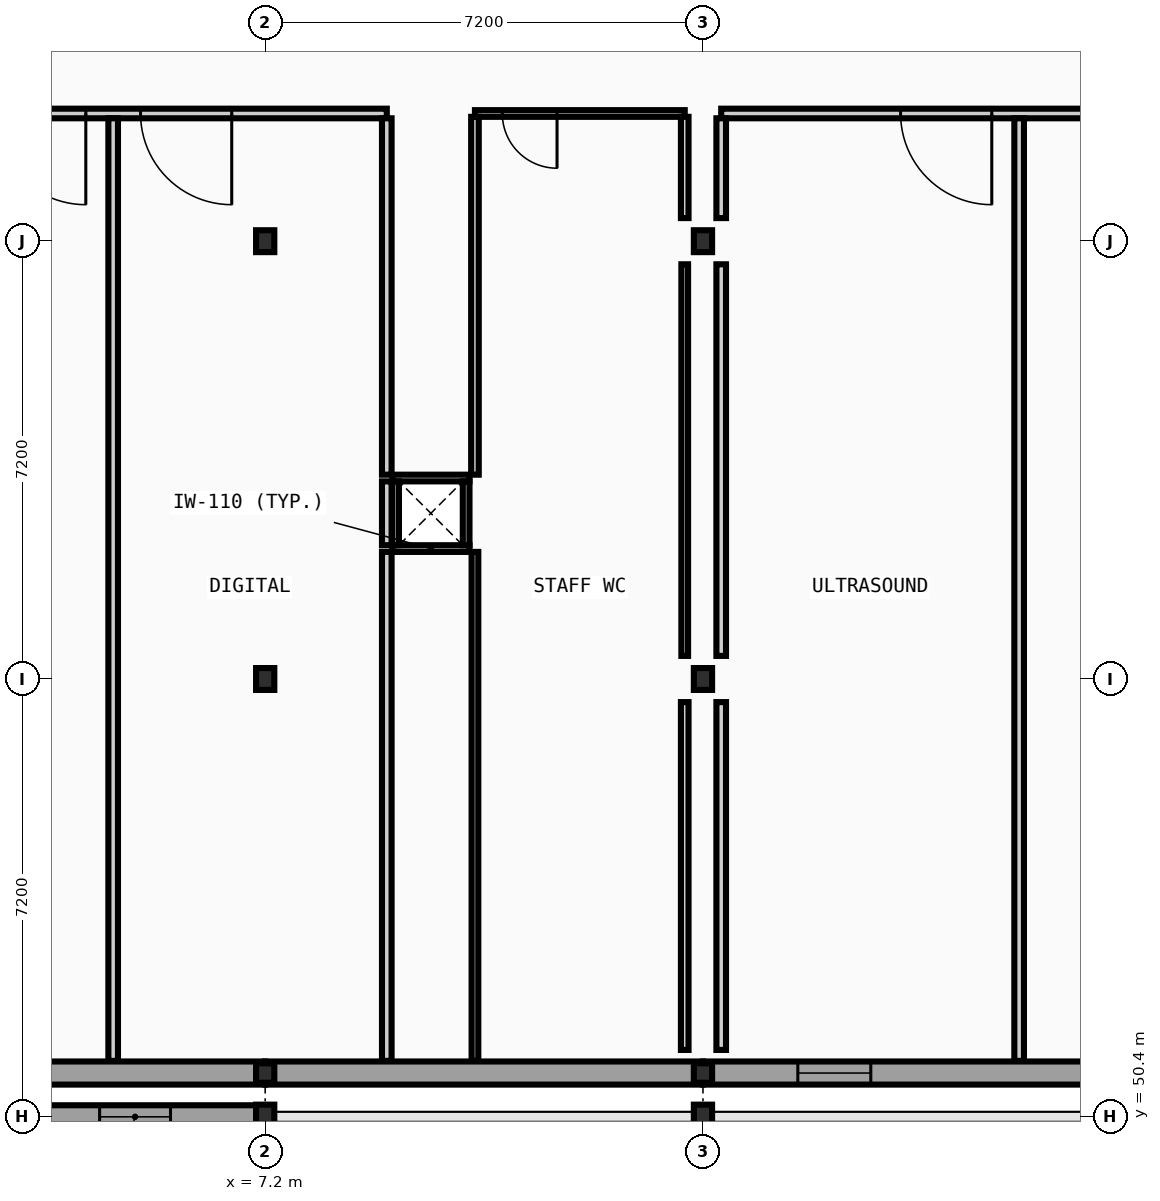
"""IFC4 building model, lengths in metres.
Left out: names, types, materials, properties, quantities, classifications, styles, units other than length and angle.
Written with IfcOpenShell. Run it as: python <this file> out.ifc"""

import sys

from ifc_helpers import new_model, si_unit, direction, frame, frame_2d, origin, origin_2d, place, context, subcontext, project, spatial, rectangle, i_section, extrude, element, fill, save


model = new_model("IFC4")
c1 = context("Model", 3, precision=1e-05, world=origin(), true_north=direction((0.0, 1.0)))
c2 = subcontext(c1, "Body", "Model", "MODEL_VIEW")
j1 = project(units=[si_unit("LENGTHUNIT", "METRE"), si_unit("PLANEANGLEUNIT", "RADIAN")], contexts=[c1])
p1 = place(None, origin())
s1 = spatial("IfcSite", under=j1, at=p1, CompositionType="ELEMENT")
p2 = place(p1, origin())
s2 = spatial("IfcBuilding", under=s1, at=p2, CompositionType="ELEMENT")
p3 = place(p2, frame((0.0, 0.0, 5.2)))
s3 = spatial("IfcBuildingStorey", under=s2, at=p3, CompositionType="ELEMENT", Elevation=5.2)
p4 = place(p3, frame((7.2, 50.4, 0.0), z_axis=(0.0, 0.0, 1.0), x_axis=(1.0, 0.0, 0.0)))
e1 = element("IfcColumn", 1, at=p4, inside=s3, PredefinedType="COLUMN", context=c2, shape_type="SweptSolid", body=[
    extrude(i_section(OverallWidth=0.3, OverallDepth=0.4, WebThickness=0.013, FlangeThickness=0.024, FilletRadius=0.027, at=origin_2d()), origin(), (0.0, 0.0, 1.0), 4.4),
])
p5 = place(p3, frame((7.2, 51.12, 0.0), z_axis=(0.0, 0.0, 1.0), x_axis=(1.0, 0.0, 0.0)))
e2 = element("IfcColumn", 2, at=p5, inside=s3, PredefinedType="COLUMN", context=c2, shape_type="SweptSolid", body=[
    extrude(i_section(OverallWidth=0.3, OverallDepth=0.32, WebThickness=0.011, FlangeThickness=0.021, FilletRadius=0.027, at=origin_2d()), origin(), (0.0, 0.0, 1.0), 4.4),
])
for number, where, z_axis, x_axis in (
    (3, (7.2, 57.6, 0.0), (0.0, 0.0, 1.0), (1.0, 0.0, 0.0)),
    (4, (7.2, 64.8, 0.0), (0.0, 0.0, 1.0), (1.0, 0.0, 0.0)),
):
    element("IfcColumn", number, at=place(p3, frame(where, z_axis=z_axis, x_axis=x_axis)), inside=s3, PredefinedType="COLUMN", context=c2, shape_type="SweptSolid", body=[
        extrude(i_section(OverallWidth=0.3, OverallDepth=0.36, WebThickness=0.012, FlangeThickness=0.022, FilletRadius=0.027, at=origin_2d()), origin(), (0.0, 0.0, 1.0), 4.4),
    ])
p6 = place(p3, frame((14.4, 50.4, 0.0), z_axis=(0.0, 0.0, 1.0), x_axis=(1.0, 0.0, 0.0)))
e5 = element("IfcColumn", 5, at=p6, inside=s3, PredefinedType="COLUMN", context=c2, shape_type="SweptSolid", body=[
    extrude(i_section(OverallWidth=0.3, OverallDepth=0.4, WebThickness=0.013, FlangeThickness=0.024, FilletRadius=0.027, at=origin_2d()), origin(), (0.0, 0.0, 1.0), 4.4),
])
p7 = place(p3, frame((14.4, 51.12, 0.0), z_axis=(0.0, 0.0, 1.0), x_axis=(1.0, 0.0, 0.0)))
e6 = element("IfcColumn", 6, at=p7, inside=s3, PredefinedType="COLUMN", context=c2, shape_type="SweptSolid", body=[
    extrude(i_section(OverallWidth=0.3, OverallDepth=0.32, WebThickness=0.011, FlangeThickness=0.021, FilletRadius=0.027, at=origin_2d()), origin(), (0.0, 0.0, 1.0), 4.4),
])
for number, where, z_axis, x_axis in (
    (7, (14.4, 57.6, 0.0), (0.0, 0.0, 1.0), (1.0, 0.0, 0.0)),
    (8, (14.4, 64.8, 0.0), (0.0, 0.0, 1.0), (1.0, 0.0, 0.0)),
):
    element("IfcColumn", number, at=place(p3, frame(where, z_axis=z_axis, x_axis=x_axis)), inside=s3, PredefinedType="COLUMN", context=c2, shape_type="SweptSolid", body=[
        extrude(i_section(OverallWidth=0.3, OverallDepth=0.36, WebThickness=0.012, FlangeThickness=0.022, FilletRadius=0.027, at=origin_2d()), origin(), (0.0, 0.0, 1.0), 4.4),
    ])
p8 = place(p3, frame((7.31, 50.4, 0.0), z_axis=(0.0, 0.0, 1.0), x_axis=(-1.0, 0.0, 0.0)))
e9 = element("IfcWall", 9, at=p8, inside=s3, PredefinedType="STANDARD", context=c2, shape_type="SweptSolid", body=[
    extrude(rectangle(XDim=7.5, YDim=0.38, at=frame_2d((3.75, 0.0))), origin(), (0.0, 0.0, 1.0), 3.88),
])
p9 = place(p8, frame((1.667, 0.0, 0.95)))
e10 = element("IfcOpeningElement", 10, at=p9, cuts=e9, PredefinedType="OPENING", context=c2, shape_type="SweptSolid", body=[
    extrude(rectangle(XDim=1.166, YDim=1.26, at=frame_2d((0.583, 0.63))), frame((0.0, 0.2, 0.0), z_axis=(0.0, -1.0, 0.0), x_axis=(1.0, 0.0, 0.0)), (0.0, 0.0, 1.0), 0.4),
])
p10 = place(p8, frame((4.667, 0.0, 0.95)))
e11 = element("IfcOpeningElement", 11, at=p10, cuts=e9, PredefinedType="OPENING", context=c2, shape_type="SweptSolid", body=[
    extrude(rectangle(XDim=1.166, YDim=1.26, at=frame_2d((0.583, 0.63))), frame((0.0, 0.2, 0.0), z_axis=(0.0, -1.0, 0.0), x_axis=(1.0, 0.0, 0.0)), (0.0, 0.0, 1.0), 0.4),
])
p11 = place(p3, frame((-0.19, 51.12, 0.0), z_axis=(0.0, 0.0, 1.0), x_axis=(1.0, 0.0, 0.0)))
e12 = element("IfcWall", 12, at=p11, inside=s3, PredefinedType="STANDARD", context=c2, shape_type="SweptSolid", body=[
    extrude(rectangle(XDim=7.39, YDim=0.38, at=frame_2d((3.695, 0.0))), origin(), (0.0, 0.0, 1.0), 3.88),
])
p12 = place(p11, frame((1.317, 0.0, 0.9)))
e13 = element("IfcOpeningElement", 13, at=p12, cuts=e12, PredefinedType="OPENING", context=c2, shape_type="SweptSolid", body=[
    extrude(rectangle(XDim=1.8, YDim=1.8, at=frame_2d((0.9, 0.9))), frame((0.0, 0.2, 0.0), z_axis=(0.0, -1.0, 0.0), x_axis=(1.0, 0.0, 0.0)), (0.0, 0.0, 1.0), 0.4),
])
p13 = place(p3, frame((7.2, 51.12, 0.0), z_axis=(0.0, 0.0, 1.0), x_axis=(1.0, 0.0, 0.0)))
e14 = element("IfcWall", 14, at=p13, inside=s3, PredefinedType="STANDARD", context=c2, shape_type="SweptSolid", body=[
    extrude(rectangle(XDim=7.2, YDim=0.38, at=frame_2d((3.6, 0.0))), origin(), (0.0, 0.0, 1.0), 3.88),
])
p14 = place(p3, frame((14.4, 51.12, 0.0), z_axis=(0.0, 0.0, 1.0), x_axis=(1.0, 0.0, 0.0)))
e15 = element("IfcWall", 15, at=p14, inside=s3, PredefinedType="STANDARD", context=c2, shape_type="SweptSolid", body=[
    extrude(rectangle(XDim=7.2, YDim=0.38, at=frame_2d((3.6, 0.0))), origin(), (0.0, 0.0, 1.0), 3.88),
])
p15 = place(p14, frame((1.56, 0.0, 0.9)))
e16 = element("IfcOpeningElement", 16, at=p15, cuts=e15, PredefinedType="OPENING", context=c2, shape_type="SweptSolid", body=[
    extrude(rectangle(XDim=1.2, YDim=1.8, at=frame_2d((0.6, 0.9))), frame((0.0, 0.2, 0.0), z_axis=(0.0, -1.0, 0.0), x_axis=(1.0, 0.0, 0.0)), (0.0, 0.0, 1.0), 0.4),
])
for number, where, z_axis, x_axis in (
    (17, (9.29, 59.745, 0.0), (0.0, 0.0, 1.0), (1.0, 0.0, 0.0)),
    (18, (9.29, 60.905, 0.0), (0.0, 0.0, 1.0), (1.0, 0.0, 0.0)),
):
    element("IfcWall", number, at=place(p3, frame(where, z_axis=z_axis, x_axis=x_axis)), inside=s3, PredefinedType="PARTITIONING", context=c2, shape_type="SweptSolid", body=[
        extrude(rectangle(XDim=1.27, YDim=0.11, at=frame_2d((0.635, 0.0))), origin(), (0.0, 0.0, 1.0), 4.185),
    ])
for number, where, z_axis, x_axis in (
    (19, (9.345, 59.8, 0.0), (0.0, 0.0, 1.0), (0.0, 1.0, 0.0)),
    (20, (10.505, 59.8, 0.0), (0.0, 0.0, 1.0), (0.0, 1.0, 0.0)),
):
    element("IfcWall", number, at=place(p3, frame(where, z_axis=z_axis, x_axis=x_axis)), inside=s3, PredefinedType="PARTITIONING", context=c2, shape_type="SweptSolid", body=[
        extrude(rectangle(XDim=1.05, YDim=0.11, at=frame_2d((0.525, 0.0))), origin(), (0.0, 0.0, 1.0), 4.185),
    ])
p16 = place(p3, frame((0.2, 66.9, 0.0), z_axis=(0.0, 0.0, 1.0), x_axis=(1.0, 0.0, 0.0)))
e21 = element("IfcWall", 21, at=p16, inside=s3, PredefinedType="PARTITIONING", context=c2, shape_type="SweptSolid", body=[
    extrude(rectangle(XDim=9.0, YDim=0.158, at=frame_2d((4.5, 0.0))), origin(), (0.0, 0.0, 1.0), 4.185),
])
p17 = place(p16, frame((4.95, 0.0, 0.0)))
e22 = element("IfcOpeningElement", 22, at=p17, cuts=e21, PredefinedType="OPENING", context=c2, shape_type="SweptSolid", body=[
    extrude(rectangle(XDim=1.5, YDim=2.2, at=frame_2d((0.75, 1.1))), frame((0.0, 0.089, 0.0), z_axis=(0.0, -1.0, 0.0), x_axis=(1.0, 0.0, 0.0)), (0.0, 0.0, 1.0), 0.178),
])
p18 = place(p16, frame((2.55, 0.0, 0.0)))
e23 = element("IfcOpeningElement", 23, at=p18, cuts=e21, PredefinedType="OPENING", context=c2, shape_type="SweptSolid", body=[
    extrude(rectangle(XDim=1.5, YDim=2.2, at=frame_2d((0.75, 1.1))), frame((0.0, 0.089, 0.0), z_axis=(0.0, -1.0, 0.0), x_axis=(1.0, 0.0, 0.0)), (0.0, 0.0, 1.0), 0.178),
])
p19 = place(p3, frame((10.65, 66.9, 0.0), z_axis=(0.0, 0.0, 1.0), x_axis=(1.0, 0.0, 0.0)))
e24 = element("IfcWall", 24, at=p19, inside=s3, PredefinedType="PARTITIONING", context=c2, shape_type="SweptSolid", body=[
    extrude(rectangle(XDim=3.45, YDim=0.11, at=frame_2d((1.725, 0.0))), origin(), (0.0, 0.0, 1.0), 4.185),
])
p20 = place(p19, frame((0.45, 0.0, 0.0)))
e25 = element("IfcOpeningElement", 25, at=p20, cuts=e24, PredefinedType="OPENING", context=c2, shape_type="SweptSolid", body=[
    extrude(rectangle(XDim=0.9, YDim=2.1, at=frame_2d((0.45, 1.05))), frame((0.0, 0.065, 0.0), z_axis=(0.0, -1.0, 0.0), x_axis=(1.0, 0.0, 0.0)), (0.0, 0.0, 1.0), 0.13),
])
p21 = place(p3, frame((14.7, 66.9, 0.0), z_axis=(0.0, 0.0, 1.0), x_axis=(1.0, 0.0, 0.0)))
e26 = element("IfcWall", 26, at=p21, inside=s3, PredefinedType="PARTITIONING", context=c2, shape_type="SweptSolid", body=[
    extrude(rectangle(XDim=13.9, YDim=0.158, at=frame_2d((6.95, 0.0))), origin(), (0.0, 0.0, 1.0), 4.185),
])
p22 = place(p21, frame((2.95, 0.0, 0.0)))
e27 = element("IfcOpeningElement", 27, at=p22, cuts=e26, PredefinedType="OPENING", context=c2, shape_type="SweptSolid", body=[
    extrude(rectangle(XDim=1.5, YDim=2.2, at=frame_2d((0.75, 1.1))), frame((0.0, 0.089, 0.0), z_axis=(0.0, -1.0, 0.0), x_axis=(1.0, 0.0, 0.0)), (0.0, 0.0, 1.0), 0.178),
])
p23 = place(p21, frame((8.843, 0.0, 0.0)))
e28 = element("IfcOpeningElement", 28, at=p23, cuts=e26, PredefinedType="OPENING", context=c2, shape_type="SweptSolid", body=[
    extrude(rectangle(XDim=1.114, YDim=2.124, at=frame_2d((0.557, 1.062))), frame((0.0, 0.089, 0.0), z_axis=(0.0, -1.0, 0.0), x_axis=(1.0, 0.0, 0.0)), (0.0, 0.0, 1.0), 0.178),
])
p24 = place(p3, frame((4.7, 51.32, 0.0), z_axis=(0.0, 0.0, 1.0), x_axis=(0.0, 1.0, 0.0)))
e29 = element("IfcWall", 29, at=p24, inside=s3, PredefinedType="PARTITIONING", context=c2, shape_type="SweptSolid", body=[
    extrude(rectangle(XDim=15.501, YDim=0.158, at=frame_2d((7.75, 0.0))), origin(), (0.0, 0.0, 1.0), 3.9),
])
p25 = place(p3, frame((9.2, 51.32, 0.0), z_axis=(0.0, 0.0, 1.0), x_axis=(0.0, 1.0, 0.0)))
e30 = element("IfcWall", 30, at=p25, inside=s3, PredefinedType="PARTITIONING", context=c2, shape_type="SweptSolid", body=[
    extrude(rectangle(XDim=8.37, YDim=0.158, at=frame_2d((4.185, 0.0))), origin(), (0.0, 0.0, 1.0), 4.185),
])
p26 = place(p3, frame((9.2, 59.8, 0.0), z_axis=(0.0, 0.0, 1.0), x_axis=(0.0, 1.0, 0.0)))
e31 = element("IfcWall", 31, at=p26, inside=s3, PredefinedType="PARTITIONING", context=c2, shape_type="SweptSolid", body=[
    extrude(rectangle(XDim=1.05, YDim=0.158, at=frame_2d((0.525, 0.0))), origin(), (0.0, 0.0, 1.0), 4.185),
])
p27 = place(p3, frame((9.2, 60.96, 0.0), z_axis=(0.0, 0.0, 1.0), x_axis=(0.0, 1.0, 0.0)))
e32 = element("IfcWall", 32, at=p27, inside=s3, PredefinedType="PARTITIONING", context=c2, shape_type="SweptSolid", body=[
    extrude(rectangle(XDim=5.861, YDim=0.158, at=frame_2d((2.931, 0.0))), origin(), (0.0, 0.0, 1.0), 4.185),
])
p28 = place(p3, frame((10.65, 51.32, 0.0), z_axis=(0.0, 0.0, 1.0), x_axis=(0.0, 1.0, 0.0)))
e33 = element("IfcWall", 33, at=p28, inside=s3, PredefinedType="PARTITIONING", context=c2, shape_type="SweptSolid", body=[
    extrude(rectangle(XDim=8.37, YDim=0.11, at=frame_2d((4.185, 0.0))), origin(), (0.0, 0.0, 1.0), 4.185),
])
p29 = place(p3, frame((10.65, 60.96, 0.0), z_axis=(0.0, 0.0, 1.0), x_axis=(0.0, 1.0, 0.0)))
e34 = element("IfcWall", 34, at=p29, inside=s3, PredefinedType="PARTITIONING", context=c2, shape_type="SweptSolid", body=[
    extrude(rectangle(XDim=5.885, YDim=0.125, at=frame_2d((2.942, 0.0))), origin(), (0.0, 0.0, 1.0), 4.185),
])
p30 = place(p3, frame((14.1, 51.5, 0.0), z_axis=(0.0, 0.0, 1.0), x_axis=(0.0, 1.0, 0.0)))
e35 = element("IfcWall", 35, at=p30, inside=s3, PredefinedType="PARTITIONING", context=c2, shape_type="SweptSolid", body=[
    extrude(rectangle(XDim=5.72, YDim=0.125, at=frame_2d((2.86, 0.0))), origin(), (0.0, 0.0, 1.0), 4.185),
])
p31 = place(p3, frame((14.1, 57.98, 0.0), z_axis=(0.0, 0.0, 1.0), x_axis=(0.0, 1.0, 0.0)))
e36 = element("IfcWall", 36, at=p31, inside=s3, PredefinedType="PARTITIONING", context=c2, shape_type="SweptSolid", body=[
    extrude(rectangle(XDim=6.44, YDim=0.11, at=frame_2d((3.22, 0.0))), origin(), (0.0, 0.0, 1.0), 4.185),
])
p32 = place(p3, frame((14.1, 65.18, 0.0), z_axis=(0.0, 0.0, 1.0), x_axis=(0.0, 1.0, 0.0)))
e37 = element("IfcWall", 37, at=p32, inside=s3, PredefinedType="PARTITIONING", context=c2, shape_type="SweptSolid", body=[
    extrude(rectangle(XDim=1.665, YDim=0.125, at=frame_2d((0.833, 0.0))), origin(), (0.0, 0.0, 1.0), 4.185),
])
p33 = place(p3, frame((14.7, 51.5, 0.0), z_axis=(0.0, 0.0, 1.0), x_axis=(0.0, 1.0, 0.0)))
e38 = element("IfcWall", 38, at=p33, inside=s3, PredefinedType="PARTITIONING", context=c2, shape_type="SweptSolid", body=[
    extrude(rectangle(XDim=5.72, YDim=0.158, at=frame_2d((2.86, 0.0))), origin(), (0.0, 0.0, 1.0), 3.88),
])
p34 = place(p3, frame((14.7, 57.98, 0.0), z_axis=(0.0, 0.0, 1.0), x_axis=(0.0, 1.0, 0.0)))
e39 = element("IfcWall", 39, at=p34, inside=s3, PredefinedType="PARTITIONING", context=c2, shape_type="SweptSolid", body=[
    extrude(rectangle(XDim=6.44, YDim=0.158, at=frame_2d((3.22, 0.0))), origin(), (0.0, 0.0, 1.0), 3.88),
])
p35 = place(p3, frame((14.7, 65.18, 0.0), z_axis=(0.0, 0.0, 1.0), x_axis=(0.0, 1.0, 0.0)))
e40 = element("IfcWall", 40, at=p35, inside=s3, PredefinedType="PARTITIONING", context=c2, shape_type="SweptSolid", body=[
    extrude(rectangle(XDim=1.641, YDim=0.158, at=frame_2d((0.821, 0.0))), origin(), (0.0, 0.0, 1.0), 3.88),
])
p36 = place(p3, frame((19.6, 51.32, 0.0), z_axis=(0.0, 0.0, 1.0), x_axis=(0.0, 1.0, 0.0)))
e41 = element("IfcWall", 41, at=p36, inside=s3, PredefinedType="PARTITIONING", context=c2, shape_type="SweptSolid", body=[
    extrude(rectangle(XDim=15.501, YDim=0.158, at=frame_2d((7.75, 0.0))), origin(), (0.0, 0.0, 1.0), 4.185),
])
p37 = place(p9, origin())
e42 = element("IfcWindow", 42, at=p37, inside=s3, PartitioningType="SINGLE_PANEL", PredefinedType="WINDOW", context=c2, shape_type="SweptSolid", body=[
    extrude(rectangle(XDim=1.166, YDim=1.26, at=frame_2d((0.583, 0.63))), frame((0.0, 0.03, 0.0), z_axis=(0.0, -1.0, 0.0), x_axis=(1.0, 0.0, 0.0)), (0.0, 0.0, 1.0), 0.06),
])
fill(e10, e42)
p38 = place(p15, origin())
e43 = element("IfcWindow", 43, at=p38, inside=s3, PartitioningType="SINGLE_PANEL", PredefinedType="WINDOW", context=c2, shape_type="SweptSolid", body=[
    extrude(rectangle(XDim=1.2, YDim=1.8, at=frame_2d((0.6, 0.9))), frame((0.0, 0.03, 0.0), z_axis=(0.0, -1.0, 0.0), x_axis=(1.0, 0.0, 0.0)), (0.0, 0.0, 1.0), 0.06),
])
fill(e16, e43)
p39 = place(p20, origin())
e44 = element("IfcDoor", 44, at=p39, inside=s3, OperationType="SINGLE_SWING_RIGHT", PredefinedType="DOOR", context=c2, shape_type="SweptSolid", body=[
    extrude(rectangle(XDim=0.9, YDim=2.1, at=frame_2d((0.45, 1.05))), frame((0.0, 0.025, 0.0), z_axis=(0.0, -1.0, 0.0), x_axis=(1.0, 0.0, 0.0)), (0.0, 0.0, 1.0), 0.05),
])
fill(e25, e44)
p40 = place(p17, origin())
e45 = element("IfcDoor", 45, at=p40, inside=s3, OperationType="DOUBLE_DOOR_SINGLE_SWING", PredefinedType="DOOR", context=c2, shape_type="SweptSolid", body=[
    extrude(rectangle(XDim=1.5, YDim=2.2, at=frame_2d((0.75, 1.1))), frame((0.0, 0.025, 0.0), z_axis=(0.0, -1.0, 0.0), x_axis=(1.0, 0.0, 0.0)), (0.0, 0.0, 1.0), 0.05),
])
fill(e22, e45)
p41 = place(p18, origin())
e46 = element("IfcDoor", 46, at=p41, inside=s3, OperationType="DOUBLE_DOOR_SINGLE_SWING", PredefinedType="DOOR", context=c2, shape_type="SweptSolid", body=[
    extrude(rectangle(XDim=1.5, YDim=2.2, at=frame_2d((0.75, 1.1))), frame((0.0, 0.025, 0.0), z_axis=(0.0, -1.0, 0.0), x_axis=(1.0, 0.0, 0.0)), (0.0, 0.0, 1.0), 0.05),
])
fill(e23, e46)
p42 = place(p22, origin())
e47 = element("IfcDoor", 47, at=p42, inside=s3, OperationType="DOUBLE_DOOR_SINGLE_SWING", PredefinedType="DOOR", context=c2, shape_type="SweptSolid", body=[
    extrude(rectangle(XDim=1.5, YDim=2.2, at=frame_2d((0.75, 1.1))), frame((0.0, 0.025, 0.0), z_axis=(0.0, -1.0, 0.0), x_axis=(1.0, 0.0, 0.0)), (0.0, 0.0, 1.0), 0.05),
])
fill(e27, e47)
save(model, sys.argv[1])
